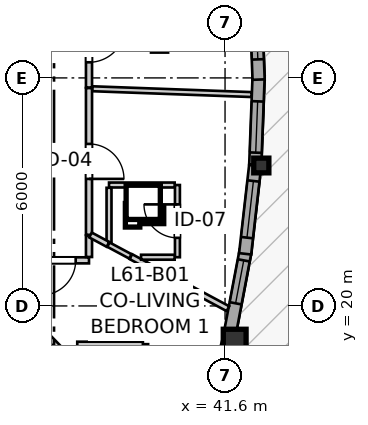
"""IFC4 building model, lengths in metres.
Left out: names, types, materials, properties, quantities, classifications, styles, units other than length and angle.
Written with IfcOpenShell. Run it as: python <this file> out.ifc"""

import sys

from ifc_helpers import new_model, si_unit, direction, frame, frame_2d, origin, origin_2d, place, context, subcontext, project, spatial, rectangle, i_section, extrude, source, transform, mapped, element, fill, save


model = new_model("IFC4")
c1 = context("Model", 3, precision=1e-05, world=origin(), true_north=direction((0.0, 1.0)))
c2 = subcontext(c1, "Body", "Model", "MODEL_VIEW")
j1 = project(units=[si_unit("LENGTHUNIT", "METRE"), si_unit("PLANEANGLEUNIT", "RADIAN")], contexts=[c1])
p1 = place(None, origin())
s1 = spatial("IfcSite", under=j1, at=p1, CompositionType="ELEMENT")
p2 = place(p1, origin())
s2 = spatial("IfcBuilding", under=s1, at=p2, CompositionType="ELEMENT")
p3 = place(p2, frame((0.0, 0.0, 205.2)))
s3 = spatial("IfcBuildingStorey", under=s2, at=p3, CompositionType="ELEMENT", Elevation=205.2)
m1 = source(origin(), c2, "Body", "SweptSolid", [
    extrude(rectangle(XDim=0.6, YDim=0.6, at=origin_2d()), origin(), (0.0, 0.0, 1.0), 2.935),
])
p4 = place(p3, frame((41.854, 19.086, 0.0), z_axis=(0.0, 0.0, 1.0), x_axis=(1.0, 0.0, 0.0)))
e1 = element("IfcColumn", 1, at=p4, inside=s3, PredefinedType="COLUMN", context=c2, shape_type="MappedRepresentation", body=[
    mapped(m1, transform((0.0, 0.0, 0.0), x_axis=(1.0, 0.0, 0.0), y_axis=(0.0, 1.0, 0.0), z_axis=(0.0, 0.0, 1.0), scale=1.0)),
])
m2 = source(origin(), c2, "Body", "SweptSolid", [
    extrude(i_section(OverallWidth=0.398, OverallDepth=0.387, WebThickness=0.019, FlangeThickness=0.03, FilletRadius=0.015, at=origin_2d()), origin(), (0.0, 0.0, 1.0), 2.935),
])
p5 = place(p3, frame((42.554, 23.696, 0.0), z_axis=(0.0, 0.0, 1.0), x_axis=(1.0, 0.0, 0.0)))
e2 = element("IfcColumn", 2, at=p5, inside=s3, PredefinedType="PILASTER", context=c2, shape_type="MappedRepresentation", body=[
    mapped(m2, transform((0.0, 0.0, 0.0), x_axis=(1.0, 0.0, 0.0), y_axis=(0.0, 1.0, 0.0), z_axis=(0.0, 0.0, 1.0), scale=1.0)),
])
p6 = place(p3, frame((41.076, 16.786, 0.0), z_axis=(0.0, 0.0, 1.0), x_axis=(0.257037260973, 0.966401493413, 0.0)))
e3 = element("IfcWall", 3, at=p6, inside=s3, PredefinedType="SOLIDWALL", context=c2, shape_type="SweptSolid", body=[
    extrude(rectangle(XDim=2.333, YDim=0.32, at=frame_2d((1.167, 0.0))), origin(), (0.0, 0.0, 1.0), 2.555),
])
p7 = place(p6, frame((0.446, 0.0, 0.82)))
e4 = element("IfcOpeningElement", 4, at=p7, cuts=e3, PredefinedType="OPENING", context=c2, shape_type="SweptSolid", body=[
    extrude(rectangle(XDim=1.45, YDim=1.25, at=frame_2d((0.725, 0.625))), frame((0.0, 0.17, 0.0), z_axis=(0.0, -1.0, 0.0), x_axis=(1.0, 0.0, 0.0)), (0.0, 0.0, 1.0), 0.34),
])
p8 = place(p3, frame((41.713, 19.205, 0.0), z_axis=(0.0, 0.0, 1.0), x_axis=(0.186691464441, 0.982418595663, 0.0)))
e5 = element("IfcWall", 5, at=p8, inside=s3, PredefinedType="SOLIDWALL", context=c2, shape_type="SweptSolid", body=[
    extrude(rectangle(XDim=2.294, YDim=0.32, at=frame_2d((1.147, 0.0))), origin(), (0.0, 0.0, 1.0), 2.555),
])
p9 = place(p8, frame((0.88, 0.0, 0.82)))
e6 = element("IfcOpeningElement", 6, at=p9, cuts=e5, PredefinedType="OPENING", context=c2, shape_type="SweptSolid", body=[
    extrude(rectangle(XDim=1.15, YDim=1.2, at=frame_2d((0.575, 0.6))), frame((0.0, 0.17, 0.0), z_axis=(0.0, -1.0, 0.0), x_axis=(1.0, 0.0, 0.0)), (0.0, 0.0, 1.0), 0.34),
])
p10 = place(p3, frame((42.128, 21.371, 0.0), z_axis=(0.0, 0.0, 1.0), x_axis=(0.113319777802, 0.993558567956, 0.0)))
e7 = element("IfcWall", 7, at=p10, inside=s3, PredefinedType="SOLIDWALL", context=c2, shape_type="SweptSolid", body=[
    extrude(rectangle(XDim=2.338, YDim=0.32, at=frame_2d((1.169, 0.0))), origin(), (0.0, 0.0, 1.0), 2.555),
])
p11 = place(p10, frame((0.429, 0.0, 0.82)))
e8 = element("IfcOpeningElement", 8, at=p11, cuts=e7, PredefinedType="OPENING", context=c2, shape_type="SweptSolid", body=[
    extrude(rectangle(XDim=1.5, YDim=1.45, at=frame_2d((0.75, 0.725))), frame((0.0, 0.17, 0.0), z_axis=(0.0, -1.0, 0.0), x_axis=(1.0, 0.0, 0.0)), (0.0, 0.0, 1.0), 0.34),
])
p12 = place(p3, frame((42.395, 23.722, 0.0), z_axis=(0.0, 0.0, 1.0), x_axis=(0.038025668885, 0.999276762717, 0.0)))
e9 = element("IfcWall", 9, at=p12, inside=s3, PredefinedType="SOLIDWALL", context=c2, shape_type="SweptSolid", body=[
    extrude(rectangle(XDim=2.324, YDim=0.32, at=frame_2d((1.162, 0.0))), origin(), (0.0, 0.0, 1.0), 2.555),
])
p13 = place(p12, frame((0.312, 0.0, 0.82)))
e10 = element("IfcOpeningElement", 10, at=p13, cuts=e9, PredefinedType="OPENING", context=c2, shape_type="SweptSolid", body=[
    extrude(rectangle(XDim=1.35, YDim=1.45, at=frame_2d((0.675, 0.725))), frame((0.0, 0.17, 0.0), z_axis=(0.0, -1.0, 0.0), x_axis=(1.0, 0.0, 0.0)), (0.0, 0.0, 1.0), 0.34),
])
p14 = place(p3, frame((42.483, 25.956, 0.0), z_axis=(0.0, 0.0, 1.0), x_axis=(-0.038013039165, 0.999277243238, 0.0)))
e11 = element("IfcWall", 11, at=p14, inside=s3, PredefinedType="SOLIDWALL", context=c2, shape_type="SweptSolid", body=[
    extrude(rectangle(XDim=2.254, YDim=0.32, at=frame_2d((1.127, 0.0))), origin(), (0.0, 0.0, 1.0), 2.555),
])
p15 = place(p14, frame((0.532, 0.0, 0.82)))
e12 = element("IfcOpeningElement", 12, at=p15, cuts=e11, PredefinedType="OPENING", context=c2, shape_type="SweptSolid", body=[
    extrude(rectangle(XDim=1.2, YDim=1.45, at=frame_2d((0.6, 0.725))), frame((0.0, 0.17, 0.0), z_axis=(0.0, -1.0, 0.0), x_axis=(1.0, 0.0, 0.0)), (0.0, 0.0, 1.0), 0.34),
])
p16 = place(p3, frame((38.02, 25.733, 0.0), z_axis=(0.0, 0.0, 1.0), x_axis=(0.0, -1.0, 0.0)))
e13 = element("IfcWall", 13, at=p16, inside=s3, PredefinedType="PARTITIONING", context=c2, shape_type="SweptSolid", body=[
    extrude(rectangle(XDim=3.862, YDim=0.16, at=frame_2d((1.931, 0.0))), origin(), (0.0, 0.0, 1.0), 2.935),
])
p17 = place(p16, frame((1.47, 0.0, 0.0)))
e14 = element("IfcOpeningElement", 14, at=p17, cuts=e13, PredefinedType="OPENING", context=c2, shape_type="SweptSolid", body=[
    extrude(rectangle(XDim=0.92, YDim=2.1, at=frame_2d((0.46, 1.05))), frame((0.0, 0.09, 0.0), z_axis=(0.0, -1.0, 0.0), x_axis=(1.0, 0.0, 0.0)), (0.0, 0.0, 1.0), 0.18),
])
p18 = place(p3, frame((38.02, 28.023, 0.0), z_axis=(0.0, 0.0, 1.0), x_axis=(0.0, -1.0, 0.0)))
e15 = element("IfcWall", 15, at=p18, inside=s3, PredefinedType="PARTITIONING", context=c2, shape_type="SweptSolid", body=[
    extrude(rectangle(XDim=2.275, YDim=0.16, at=frame_2d((1.137, 0.0))), origin(), (0.0, 0.0, 1.0), 2.935),
])
p19 = place(p18, frame((0.662, 0.0, 0.0)))
e16 = element("IfcOpeningElement", 16, at=p19, cuts=e15, PredefinedType="OPENING", context=c2, shape_type="SweptSolid", body=[
    extrude(rectangle(XDim=0.95, YDim=2.1, at=frame_2d((0.475, 1.05))), frame((0.0, 0.09, 0.0), z_axis=(0.0, -1.0, 0.0), x_axis=(1.0, 0.0, 0.0)), (0.0, 0.0, 1.0), 0.18),
])
p20 = place(p3, frame((39.511, 17.094, 0.0), z_axis=(0.0, 0.0, 1.0), x_axis=(0.0, 1.0, 0.0)))
e17 = element("IfcWall", 17, at=p20, inside=s3, PredefinedType="PARTITIONING", context=c2, shape_type="SweptSolid", body=[
    extrude(rectangle(XDim=1.9, YDim=0.13, at=frame_2d((0.95, 0.0))), origin(), (0.0, 0.0, 1.0), 2.935),
])
p21 = place(p20, frame((0.51, 0.0, 0.0)))
e18 = element("IfcOpeningElement", 18, at=p21, cuts=e17, PredefinedType="OPENING", context=c2, shape_type="SweptSolid", body=[
    extrude(rectangle(XDim=0.88, YDim=2.05, at=frame_2d((0.44, 1.025))), frame((0.0, 0.075, 0.0), z_axis=(0.0, -1.0, 0.0), x_axis=(1.0, 0.0, 0.0)), (0.0, 0.0, 1.0), 0.15),
])
p22 = place(p3, frame((40.347, 21.282, 0.0), z_axis=(0.0, 0.0, 1.0), x_axis=(0.0, 1.0, 0.0)))
e19 = element("IfcWall", 19, at=p22, inside=s3, PredefinedType="PARTITIONING", context=c2, shape_type="SweptSolid", body=[
    extrude(rectangle(XDim=1.9, YDim=0.13, at=frame_2d((0.95, 0.0))), origin(), (0.0, 0.0, 1.0), 2.573),
])
p23 = place(p22, frame((0.51, 0.0, 0.0)))
e20 = element("IfcOpeningElement", 20, at=p23, cuts=e19, PredefinedType="OPENING", context=c2, shape_type="SweptSolid", body=[
    extrude(rectangle(XDim=0.88, YDim=2.05, at=frame_2d((0.44, 1.025))), frame((0.0, 0.075, 0.0), z_axis=(0.0, -1.0, 0.0), x_axis=(1.0, 0.0, 0.0)), (0.0, 0.0, 1.0), 0.15),
])
p24 = place(p3, frame((38.02, 21.2, 0.0), z_axis=(0.0, 0.0, 1.0), x_axis=(-1.0, 0.0, 0.0)))
e21 = element("IfcWall", 21, at=p24, inside=s3, PredefinedType="PARTITIONING", context=c2, shape_type="SweptSolid", body=[
    extrude(rectangle(XDim=1.612, YDim=0.16, at=frame_2d((0.806, 0.0))), origin(), (0.0, 0.0, 1.0), 2.935),
])
p25 = place(p24, frame((0.35, 0.0, 0.0)))
e22 = element("IfcOpeningElement", 22, at=p25, cuts=e21, PredefinedType="OPENING", context=c2, shape_type="SweptSolid", body=[
    extrude(rectangle(XDim=0.92, YDim=2.1, at=frame_2d((0.46, 1.05))), frame((0.0, 0.09, 0.0), z_axis=(0.0, -1.0, 0.0), x_axis=(1.0, 0.0, 0.0)), (0.0, 0.0, 1.0), 0.18),
])
p26 = place(p3, frame((38.11, 25.715, 0.0), z_axis=(0.0, 0.0, 1.0), x_axis=(0.99933433165, -0.036481414253, 0.0)))
e23 = element("IfcWall", 23, at=p26, inside=s3, PredefinedType="PARTITIONING", context=c2, shape_type="SweptSolid", body=[
    extrude(rectangle(XDim=4.189, YDim=0.13, at=frame_2d((2.095, 0.0))), origin(), (0.0, 0.0, 1.0), 2.935),
])
p27 = place(p3, frame((39.122, 21.297, 0.0), z_axis=(0.0, 0.0, 1.0), x_axis=(0.881308328415, -0.472541670402, 0.0)))
e24 = element("IfcWall", 24, at=p27, inside=s3, PredefinedType="PARTITIONING", context=c2, shape_type="SweptSolid", body=[
    extrude(rectangle(XDim=2.898, YDim=0.145, at=frame_2d((1.449, 0.0))), origin(), (0.0, 0.0, 1.0), 2.935),
])
p28 = place(p3, frame((36.458, 19.686, 0.0), z_axis=(0.0, 0.0, 1.0), x_axis=(0.695231916786, -0.718785490868, 0.0)))
e25 = element("IfcWall", 25, at=p28, inside=s3, PredefinedType="PARTITIONING", context=c2, shape_type="SweptSolid", body=[
    extrude(rectangle(XDim=1.824, YDim=0.145, at=frame_2d((0.912, 0.0))), origin(), (0.0, 0.0, 1.0), 2.935),
])
p29 = place(p3, frame((37.711, 18.994, 0.0), z_axis=(0.0, 0.0, 1.0), x_axis=(1.0, 0.0, 0.0)))
e26 = element("IfcWall", 26, at=p29, inside=s3, PredefinedType="PARTITIONING", context=c2, shape_type="SweptSolid", body=[
    extrude(rectangle(XDim=1.727, YDim=0.13, at=frame_2d((0.864, 0.0))), origin(), (0.0, 0.0, 1.0), 2.935),
])
p30 = place(p3, frame((38.547, 23.182, 0.0), z_axis=(0.0, 0.0, 1.0), x_axis=(1.0, 0.0, 0.0)))
e27 = element("IfcWall", 27, at=p30, inside=s3, PredefinedType="PARTITIONING", context=c2, shape_type="SweptSolid", body=[
    extrude(rectangle(XDim=1.727, YDim=0.13, at=frame_2d((0.863, 0.0))), origin(), (0.0, 0.0, 1.0), 2.935),
])
p31 = place(p3, frame((38.547, 21.605, 0.0), z_axis=(0.0, 0.0, 1.0), x_axis=(0.0, 1.0, 0.0)))
e28 = element("IfcWall", 28, at=p31, inside=s3, PredefinedType="PARTITIONING", context=c2, shape_type="SweptSolid", body=[
    extrude(rectangle(XDim=1.504, YDim=0.13, at=frame_2d((0.752, 0.0))), origin(), (0.0, 0.0, 1.0), 2.603),
])
p32 = place(p3, frame((39.39, 21.282, 0.0), z_axis=(0.0, 0.0, 1.0), x_axis=(1.0, 0.0, 0.0)))
e29 = element("IfcWall", 29, at=p32, inside=s3, PredefinedType="PARTITIONING", context=c2, shape_type="SweptSolid", body=[
    extrude(rectangle(XDim=0.884, YDim=0.13, at=frame_2d((0.442, 0.0))), origin(), (0.0, 0.0, 1.0), 2.935),
])
p33 = place(p3, frame((38.02, 21.288, 0.0), z_axis=(0.0, 0.0, 1.0), x_axis=(0.0, 1.0, 0.0)))
e30 = element("IfcWall", 30, at=p33, inside=s3, PredefinedType="PARTITIONING", context=c2, shape_type="SweptSolid", body=[
    extrude(rectangle(XDim=0.568, YDim=0.16, at=frame_2d((0.284, 0.0))), origin(), (0.0, 0.0, 1.0), 2.935),
])
p34 = place(p3, frame((38.532, 21.613, 0.0), z_axis=(0.0, 0.0, 1.0), x_axis=(0.881618593919, -0.471962556626, 0.0)))
e31 = element("IfcWall", 31, at=p34, inside=s3, PredefinedType="PARTITIONING", context=c2, shape_type="SweptSolid", body=[
    extrude(rectangle(XDim=0.654, YDim=0.13, at=frame_2d((0.327, 0.0))), origin(), (0.0, 0.0, 1.0), 2.935),
])
p35 = place(p3, frame((38.06, 21.867, 0.0), z_axis=(0.0, 0.0, 1.0), x_axis=(0.881026965879, -0.473066047601, 0.0)))
e32 = element("IfcWall", 32, at=p35, inside=s3, PredefinedType="PARTITIONING", context=c2, shape_type="SweptSolid", body=[
    extrude(rectangle(XDim=0.521, YDim=0.145, at=frame_2d((0.261, 0.0))), origin(), (0.0, 0.0, 1.0), 2.935),
])
m3 = source(origin(), c2, "Body", "SweptSolid", [
    extrude(rectangle(XDim=1.15, YDim=1.2, at=frame_2d((0.575, 0.6))), frame((0.0, 0.03, 0.0), z_axis=(0.0, -1.0, 0.0), x_axis=(1.0, 0.0, 0.0)), (0.0, 0.0, 1.0), 0.06),
])
p36 = place(p9, origin())
e33 = element("IfcWindow", 33, at=p36, inside=s3, PartitioningType="SINGLE_PANEL", PredefinedType="WINDOW", context=c2, shape_type="MappedRepresentation", body=[
    mapped(m3, transform((0.0, 0.0, 0.0), x_axis=(1.0, 0.0, 0.0), y_axis=(0.0, 1.0, 0.0), z_axis=(0.0, 0.0, 1.0), scale=1.0)),
])
fill(e6, e33)
m4 = source(origin(), c2, "Body", "SweptSolid", [
    extrude(rectangle(XDim=1.5, YDim=1.45, at=frame_2d((0.75, 0.725))), frame((0.0, 0.03, 0.0), z_axis=(0.0, -1.0, 0.0), x_axis=(1.0, 0.0, 0.0)), (0.0, 0.0, 1.0), 0.06),
])
p37 = place(p11, origin())
e34 = element("IfcWindow", 34, at=p37, inside=s3, PartitioningType="SINGLE_PANEL", PredefinedType="WINDOW", context=c2, shape_type="MappedRepresentation", body=[
    mapped(m4, transform((0.0, 0.0, 0.0), x_axis=(1.0, 0.0, 0.0), y_axis=(0.0, 1.0, 0.0), z_axis=(0.0, 0.0, 1.0), scale=1.0)),
])
fill(e8, e34)
m5 = source(origin(), c2, "Body", "SweptSolid", [
    extrude(rectangle(XDim=1.35, YDim=1.45, at=frame_2d((0.675, 0.725))), frame((0.0, 0.03, 0.0), z_axis=(0.0, -1.0, 0.0), x_axis=(1.0, 0.0, 0.0)), (0.0, 0.0, 1.0), 0.06),
])
p38 = place(p13, origin())
e35 = element("IfcWindow", 35, at=p38, inside=s3, PartitioningType="SINGLE_PANEL", PredefinedType="WINDOW", context=c2, shape_type="MappedRepresentation", body=[
    mapped(m5, transform((0.0, 0.0, 0.0), x_axis=(1.0, 0.0, 0.0), y_axis=(0.0, 1.0, 0.0), z_axis=(0.0, 0.0, 1.0), scale=1.0)),
])
fill(e10, e35)
m6 = source(origin(), c2, "Body", "SweptSolid", [
    extrude(rectangle(XDim=1.2, YDim=1.45, at=frame_2d((0.6, 0.725))), frame((0.0, 0.03, 0.0), z_axis=(0.0, -1.0, 0.0), x_axis=(1.0, 0.0, 0.0)), (0.0, 0.0, 1.0), 0.06),
])
p39 = place(p15, origin())
e36 = element("IfcWindow", 36, at=p39, inside=s3, PartitioningType="SINGLE_PANEL", PredefinedType="WINDOW", context=c2, shape_type="MappedRepresentation", body=[
    mapped(m6, transform((0.0, 0.0, 0.0), x_axis=(1.0, 0.0, 0.0), y_axis=(0.0, 1.0, 0.0), z_axis=(0.0, 0.0, 1.0), scale=1.0)),
])
fill(e12, e36)
m7 = source(origin(), c2, "Body", "SweptSolid", [
    extrude(rectangle(XDim=0.92, YDim=2.1, at=frame_2d((0.46, 1.05))), frame((0.0, 0.025, 0.0), z_axis=(0.0, -1.0, 0.0), x_axis=(1.0, 0.0, 0.0)), (0.0, 0.0, 1.0), 0.05),
])
p40 = place(p17, origin())
e37 = element("IfcDoor", 37, at=p40, inside=s3, OperationType="SINGLE_SWING_RIGHT", PredefinedType="DOOR", context=c2, shape_type="MappedRepresentation", body=[
    mapped(m7, transform((0.0, 0.0, 0.0), x_axis=(1.0, 0.0, 0.0), y_axis=(0.0, 1.0, 0.0), z_axis=(0.0, 0.0, 1.0), scale=1.0)),
])
fill(e14, e37)
m8 = source(origin(), c2, "Body", "SweptSolid", [
    extrude(rectangle(XDim=0.95, YDim=2.1, at=frame_2d((0.475, 1.05))), frame((0.0, 0.025, 0.0), z_axis=(0.0, -1.0, 0.0), x_axis=(1.0, 0.0, 0.0)), (0.0, 0.0, 1.0), 0.05),
])
p41 = place(p19, origin())
e38 = element("IfcDoor", 38, at=p41, inside=s3, OperationType="SINGLE_SWING_LEFT", PredefinedType="DOOR", context=c2, shape_type="MappedRepresentation", body=[
    mapped(m8, transform((0.0, 0.0, 0.0), x_axis=(1.0, 0.0, 0.0), y_axis=(0.0, 1.0, 0.0), z_axis=(0.0, 0.0, 1.0), scale=1.0)),
])
fill(e16, e38)
m9 = source(origin(), c2, "Body", "SweptSolid", [
    extrude(rectangle(XDim=0.88, YDim=2.05, at=frame_2d((0.44, 1.025))), frame((0.0, 0.025, 0.0), z_axis=(0.0, -1.0, 0.0), x_axis=(1.0, 0.0, 0.0)), (0.0, 0.0, 1.0), 0.05),
])
p42 = place(p23, origin())
e39 = element("IfcDoor", 39, at=p42, inside=s3, OperationType="SINGLE_SWING_RIGHT", PredefinedType="DOOR", context=c2, shape_type="MappedRepresentation", body=[
    mapped(m9, transform((0.0, 0.0, 0.0), x_axis=(1.0, 0.0, 0.0), y_axis=(0.0, 1.0, 0.0), z_axis=(0.0, 0.0, 1.0), scale=1.0)),
])
fill(e20, e39)
p43 = place(p25, origin())
e40 = element("IfcDoor", 40, at=p43, inside=s3, OperationType="SINGLE_SWING_RIGHT", PredefinedType="DOOR", context=c2, shape_type="MappedRepresentation", body=[
    mapped(m7, transform((0.0, 0.0, 0.0), x_axis=(1.0, 0.0, 0.0), y_axis=(0.0, 1.0, 0.0), z_axis=(0.0, 0.0, 1.0), scale=1.0)),
])
fill(e22, e40)
save(model, sys.argv[1])
